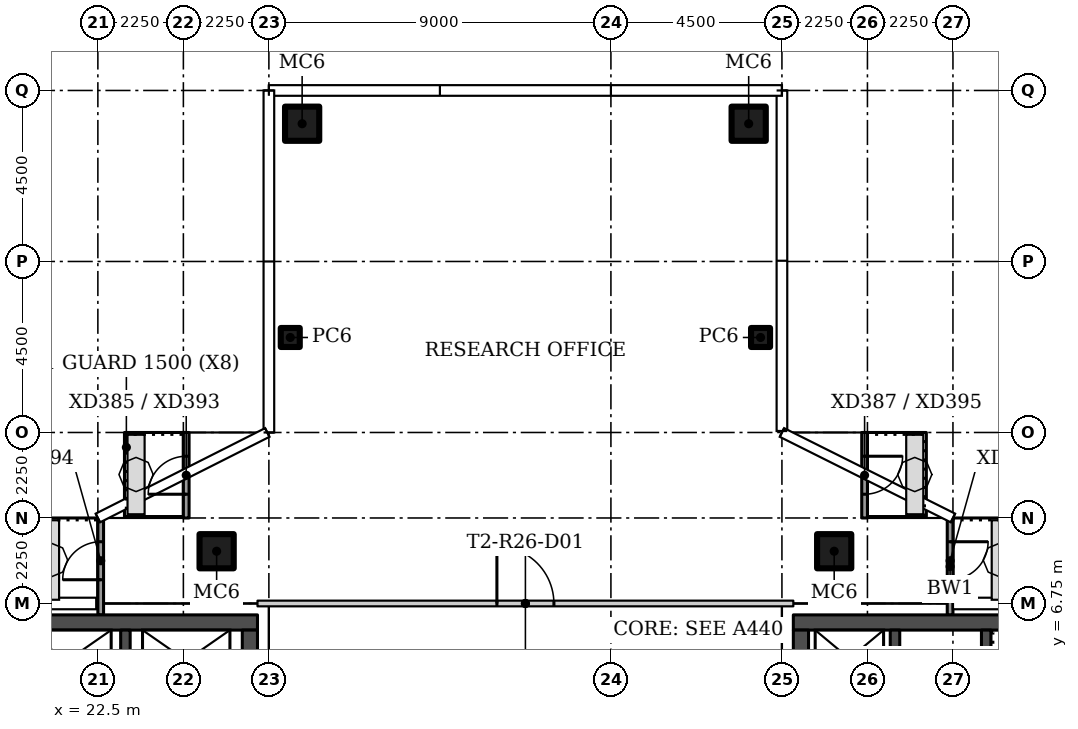
"""IFC4 building model, lengths in metres.
Left out: names, types, materials, properties, quantities, classifications, styles, units other than length and angle.
Written with IfcOpenShell. Run it as: python <this file> out.ifc"""

import sys

from ifc_helpers import new_model, si_unit, direction, frame, frame_2d, origin, origin_2d, place, context, subcontext, project, spatial, rectangle, hollow_rectangle, extrude, element, fill, save


model = new_model("IFC4")
c1 = context("Model", 3, precision=1e-05, world=origin(), true_north=direction((0.0, 1.0)))
c2 = subcontext(c1, "Body", "Model", "MODEL_VIEW")
j1 = project(units=[si_unit("LENGTHUNIT", "METRE"), si_unit("PLANEANGLEUNIT", "RADIAN")], contexts=[c1])
p1 = place(None, origin())
s1 = spatial("IfcSite", under=j1, at=p1, CompositionType="ELEMENT")
p2 = place(p1, origin())
s2 = spatial("IfcBuilding", under=s1, at=p2, CompositionType="ELEMENT")
p3 = place(p2, frame((0.0, 0.0, 242.1)))
s3 = spatial("IfcBuildingStorey", under=s2, at=p3, CompositionType="ELEMENT", Elevation=242.1)
for number, where in (
    (1, (25.625, 8.125, 0.0)),
    (2, (41.875, 8.125, 0.0)),
):
    element("IfcColumn", number, at=place(p3, frame(where)), inside=s3, PredefinedType="COLUMN", context=c2, shape_type="SweptSolid", body=[
        extrude(hollow_rectangle(XDim=0.9, YDim=0.9, WallThickness=0.036, at=origin_2d()), origin(), (0.0, 0.0, 1.0), 3.55),
    ])
p4 = place(p3, frame((39.938, 13.75, 0.0)))
e3 = element("IfcColumn", 3, at=p4, inside=s3, PredefinedType="COLUMN", context=c2, shape_type="SweptSolid", body=[
    extrude(hollow_rectangle(XDim=0.5, YDim=0.5, WallThickness=0.016, at=origin_2d()), origin(), (0.0, 0.0, 1.0), 3.55),
])
p5 = place(p3, frame((39.625, 19.375, 0.0)))
e4 = element("IfcColumn", 4, at=p5, inside=s3, PredefinedType="COLUMN", context=c2, shape_type="SweptSolid", body=[
    extrude(hollow_rectangle(XDim=0.9, YDim=0.9, WallThickness=0.036, at=origin_2d()), origin(), (0.0, 0.0, 1.0), 3.55),
])
p6 = place(p3, frame((27.562, 13.75, 0.0)))
e5 = element("IfcColumn", 5, at=p6, inside=s3, PredefinedType="COLUMN", context=c2, shape_type="SweptSolid", body=[
    extrude(hollow_rectangle(XDim=0.5, YDim=0.5, WallThickness=0.016, at=origin_2d()), origin(), (0.0, 0.0, 1.0), 3.55),
])
p7 = place(p3, frame((27.875, 19.375, 0.0)))
e6 = element("IfcColumn", 6, at=p7, inside=s3, PredefinedType="COLUMN", context=c2, shape_type="SweptSolid", body=[
    extrude(hollow_rectangle(XDim=0.9, YDim=0.9, WallThickness=0.036, at=origin_2d()), origin(), (0.0, 0.0, 1.0), 3.55),
])
p8 = place(p3, frame((26.7, 6.75, 0.0)))
e7 = element("IfcWall", 7, at=p8, inside=s3, PredefinedType="PARTITIONING", context=c2, shape_type="SweptSolid", body=[
    extrude(rectangle(XDim=14.1, YDim=0.15, at=frame_2d((7.05, 0.0))), origin(), (0.0, 0.0, 1.0), 3.55),
])
p9 = place(p8, frame((6.3, 0.0, 0.0)))
e8 = element("IfcOpeningElement", 8, at=p9, cuts=e7, PredefinedType="OPENING", context=c2, shape_type="SweptSolid", body=[
    extrude(rectangle(XDim=1.5, YDim=2.1, at=frame_2d((0.75, 1.05))), frame((0.0, 0.085, 0.0), z_axis=(0.0, -1.0, 0.0), x_axis=(1.0, 0.0, 0.0)), (0.0, 0.0, 1.0), 0.17),
])
p10 = place(p3, frame((24.825, 9.0, 0.0), z_axis=(0.0, 0.0, 1.0), x_axis=(0.0, 1.0, 0.0)))
e9 = element("IfcWall", 9, at=p10, inside=s3, PredefinedType="SOLIDWALL", context=c2, shape_type="SweptSolid", body=[
    extrude(rectangle(XDim=2.25, YDim=0.15, at=frame_2d((1.125, 0.0))), origin(), (0.0, 0.0, 1.0), 3.45),
])
p11 = place(p10, frame((0.625, 0.0, 0.0)))
e10 = element("IfcOpeningElement", 10, at=p11, cuts=e9, PredefinedType="OPENING", context=c2, shape_type="SweptSolid", body=[
    extrude(rectangle(XDim=1.0, YDim=2.4, at=frame_2d((0.5, 1.2))), frame((0.0, 0.085, 0.0), z_axis=(0.0, -1.0, 0.0), x_axis=(1.0, 0.0, 0.0)), (0.0, 0.0, 1.0), 0.17),
])
p12 = place(p3, frame((22.575, 6.448, 0.0), z_axis=(0.0, 0.0, 1.0), x_axis=(0.0, 1.0, 0.0)))
e11 = element("IfcWall", 11, at=p12, inside=s3, PredefinedType="SOLIDWALL", context=c2, shape_type="SweptSolid", body=[
    extrude(rectangle(XDim=2.552, YDim=0.15, at=frame_2d((1.276, 0.0))), origin(), (0.0, 0.0, 1.0), 3.45),
])
p13 = place(p12, frame((0.927, 0.0, 0.0)))
e12 = element("IfcOpeningElement", 12, at=p13, cuts=e11, PredefinedType="OPENING", context=c2, shape_type="SweptSolid", body=[
    extrude(rectangle(XDim=1.0, YDim=2.4, at=frame_2d((0.5, 1.2))), frame((0.0, 0.085, 0.0), z_axis=(0.0, -1.0, 0.0), x_axis=(1.0, 0.0, 0.0)), (0.0, 0.0, 1.0), 0.17),
])
p14 = place(p3, frame((42.675, 11.25, 0.0), z_axis=(0.0, 0.0, 1.0), x_axis=(0.0, -1.0, 0.0)))
e13 = element("IfcWall", 13, at=p14, inside=s3, PredefinedType="SOLIDWALL", context=c2, shape_type="SweptSolid", body=[
    extrude(rectangle(XDim=2.25, YDim=0.15, at=frame_2d((1.125, 0.0))), origin(), (0.0, 0.0, 1.0), 3.45),
])
p15 = place(p14, frame((0.625, 0.0, 0.0)))
e14 = element("IfcOpeningElement", 14, at=p15, cuts=e13, PredefinedType="OPENING", context=c2, shape_type="SweptSolid", body=[
    extrude(rectangle(XDim=1.0, YDim=2.4, at=frame_2d((0.5, 1.2))), frame((0.0, 0.085, 0.0), z_axis=(0.0, -1.0, 0.0), x_axis=(1.0, 0.0, 0.0)), (0.0, 0.0, 1.0), 0.17),
])
p16 = place(p3, frame((44.925, 9.0, 0.0), z_axis=(0.0, 0.0, 1.0), x_axis=(0.0, -1.0, 0.0)))
e15 = element("IfcWall", 15, at=p16, inside=s3, PredefinedType="SOLIDWALL", context=c2, shape_type="SweptSolid", body=[
    extrude(rectangle(XDim=2.557, YDim=0.15, at=frame_2d((1.278, 0.0))), origin(), (0.0, 0.0, 1.0), 3.45),
])
p17 = place(p16, frame((0.625, 0.0, 0.0)))
e16 = element("IfcOpeningElement", 16, at=p17, cuts=e15, PredefinedType="OPENING", context=c2, shape_type="SweptSolid", body=[
    extrude(rectangle(XDim=1.0, YDim=2.4, at=frame_2d((0.5, 1.2))), frame((0.0, 0.085, 0.0), z_axis=(0.0, -1.0, 0.0), x_axis=(1.0, 0.0, 0.0)), (0.0, 0.0, 1.0), 0.17),
])
p18 = place(p3, frame((13.8, 6.25, 0.0)))
e17 = element("IfcWall", 17, at=p18, inside=s3, PredefinedType="SHEAR", context=c2, shape_type="SweptSolid", body=[
    extrude(rectangle(XDim=12.9, YDim=0.4, at=frame_2d((6.45, 0.0))), origin(), (0.0, 0.0, 1.0), 3.55),
])
p19 = place(p3, frame((26.5, 6.05, 0.0), z_axis=(0.0, 0.0, 1.0), x_axis=(0.0, -1.0, 0.0)))
e18 = element("IfcWall", 18, at=p19, inside=s3, PredefinedType="SHEAR", context=c2, shape_type="SweptSolid", body=[
    extrude(rectangle(XDim=12.1, YDim=0.4, at=frame_2d((6.05, 0.0))), origin(), (0.0, 0.0, 1.0), 3.55),
])
p20 = place(p19, frame((10.1, 0.0, 0.0)))
e19 = element("IfcOpeningElement", 19, at=p20, cuts=e18, PredefinedType="OPENING", context=c2, shape_type="SweptSolid", body=[
    extrude(rectangle(XDim=1.2, YDim=2.1, at=frame_2d((0.6, 1.05))), frame((0.0, 0.21, 0.0), z_axis=(0.0, -1.0, 0.0), x_axis=(1.0, 0.0, 0.0)), (0.0, 0.0, 1.0), 0.42),
])
p21 = place(p19, frame((3.9, 0.0, 0.0)))
e20 = element("IfcOpeningElement", 20, at=p21, cuts=e18, PredefinedType="OPENING", context=c2, shape_type="SweptSolid", body=[
    extrude(rectangle(XDim=1.8, YDim=2.4, at=frame_2d((0.9, 1.2))), frame((0.0, 0.21, 0.0), z_axis=(0.0, -1.0, 0.0), x_axis=(1.0, 0.0, 0.0)), (0.0, 0.0, 1.0), 0.42),
])
p22 = place(p3, frame((23.225, 3.25, 0.0), z_axis=(0.0, 0.0, 1.0), x_axis=(0.0, 1.0, 0.0)))
e21 = element("IfcWall", 21, at=p22, inside=s3, PredefinedType="SHEAR", context=c2, shape_type="SweptSolid", body=[
    extrude(rectangle(XDim=2.8, YDim=0.25, at=frame_2d((1.4, 0.0))), origin(), (0.0, 0.0, 1.0), 3.55),
])
p23 = place(p3, frame((53.7, 6.25, 0.0), z_axis=(0.0, 0.0, 1.0), x_axis=(-1.0, 0.0, 0.0)))
e22 = element("IfcWall", 22, at=p23, inside=s3, PredefinedType="SHEAR", context=c2, shape_type="SweptSolid", body=[
    extrude(rectangle(XDim=12.9, YDim=0.4, at=frame_2d((6.45, 0.0))), origin(), (0.0, 0.0, 1.0), 3.55),
])
p24 = place(p3, frame((41.0, -6.05, 0.0), z_axis=(0.0, 0.0, 1.0), x_axis=(0.0, 1.0, 0.0)))
e23 = element("IfcWall", 23, at=p24, inside=s3, PredefinedType="SHEAR", context=c2, shape_type="SweptSolid", body=[
    extrude(rectangle(XDim=12.1, YDim=0.4, at=frame_2d((6.05, 0.0))), origin(), (0.0, 0.0, 1.0), 3.55),
])
p25 = place(p24, frame((0.8, 0.0, 0.0)))
e24 = element("IfcOpeningElement", 24, at=p25, cuts=e23, PredefinedType="OPENING", context=c2, shape_type="SweptSolid", body=[
    extrude(rectangle(XDim=1.2, YDim=2.1, at=frame_2d((0.6, 1.05))), frame((0.0, 0.21, 0.0), z_axis=(0.0, -1.0, 0.0), x_axis=(1.0, 0.0, 0.0)), (0.0, 0.0, 1.0), 0.42),
])
p26 = place(p24, frame((6.4, 0.0, 0.0)))
e25 = element("IfcOpeningElement", 25, at=p26, cuts=e23, PredefinedType="OPENING", context=c2, shape_type="SweptSolid", body=[
    extrude(rectangle(XDim=1.8, YDim=2.4, at=frame_2d((0.9, 1.2))), frame((0.0, 0.21, 0.0), z_axis=(0.0, -1.0, 0.0), x_axis=(1.0, 0.0, 0.0)), (0.0, 0.0, 1.0), 0.42),
])
for number, where, z_axis, x_axis in (
    (26, (45.875, 3.25, 0.0), (0.0, 0.0, 1.0), (0.0, 1.0, 0.0)),
    (27, (43.475, 3.25, 0.0), (0.0, 0.0, 1.0), (0.0, 1.0, 0.0)),
):
    element("IfcWall", number, at=place(p3, frame(where, z_axis=z_axis, x_axis=x_axis)), inside=s3, PredefinedType="SHEAR", context=c2, shape_type="SweptSolid", body=[
        extrude(rectangle(XDim=2.8, YDim=0.25, at=frame_2d((1.4, 0.0))), origin(), (0.0, 0.0, 1.0), 3.55),
    ])
p27 = place(p9, origin())
e28 = element("IfcDoor", 28, at=p27, inside=s3, OperationType="DOUBLE_DOOR_SINGLE_SWING", PredefinedType="DOOR", context=c2, shape_type="SweptSolid", body=[
    extrude(rectangle(XDim=1.5, YDim=2.1, at=frame_2d((0.75, 1.05))), frame((0.0, 0.025, 0.0), z_axis=(0.0, -1.0, 0.0), x_axis=(1.0, 0.0, 0.0)), (0.0, 0.0, 1.0), 0.05),
])
fill(e8, e28)
p28 = place(p11, origin())
e29 = element("IfcDoor", 29, at=p28, inside=s3, OperationType="SINGLE_SWING_RIGHT", PredefinedType="DOOR", context=c2, shape_type="SweptSolid", body=[
    extrude(rectangle(XDim=1.0, YDim=2.4, at=frame_2d((0.5, 1.2))), frame((0.0, 0.025, 0.0), z_axis=(0.0, -1.0, 0.0), x_axis=(1.0, 0.0, 0.0)), (0.0, 0.0, 1.0), 0.05),
])
fill(e10, e29)
p29 = place(p13, origin())
e30 = element("IfcDoor", 30, at=p29, inside=s3, OperationType="SINGLE_SWING_LEFT", PredefinedType="DOOR", context=c2, shape_type="SweptSolid", body=[
    extrude(rectangle(XDim=1.0, YDim=2.4, at=frame_2d((0.5, 1.2))), frame((0.0, 0.025, 0.0), z_axis=(0.0, -1.0, 0.0), x_axis=(1.0, 0.0, 0.0)), (0.0, 0.0, 1.0), 0.05),
])
fill(e12, e30)
p30 = place(p15, origin())
e31 = element("IfcDoor", 31, at=p30, inside=s3, OperationType="SINGLE_SWING_RIGHT", PredefinedType="DOOR", context=c2, shape_type="SweptSolid", body=[
    extrude(rectangle(XDim=1.0, YDim=2.4, at=frame_2d((0.5, 1.2))), frame((0.0, 0.025, 0.0), z_axis=(0.0, -1.0, 0.0), x_axis=(1.0, 0.0, 0.0)), (0.0, 0.0, 1.0), 0.05),
])
fill(e14, e31)
p31 = place(p17, origin())
e32 = element("IfcDoor", 32, at=p31, inside=s3, OperationType="SINGLE_SWING_LEFT", PredefinedType="DOOR", context=c2, shape_type="SweptSolid", body=[
    extrude(rectangle(XDim=1.0, YDim=2.4, at=frame_2d((0.5, 1.2))), frame((0.0, 0.025, 0.0), z_axis=(0.0, -1.0, 0.0), x_axis=(1.0, 0.0, 0.0)), (0.0, 0.0, 1.0), 0.05),
])
fill(e16, e32)
save(model, sys.argv[1])
